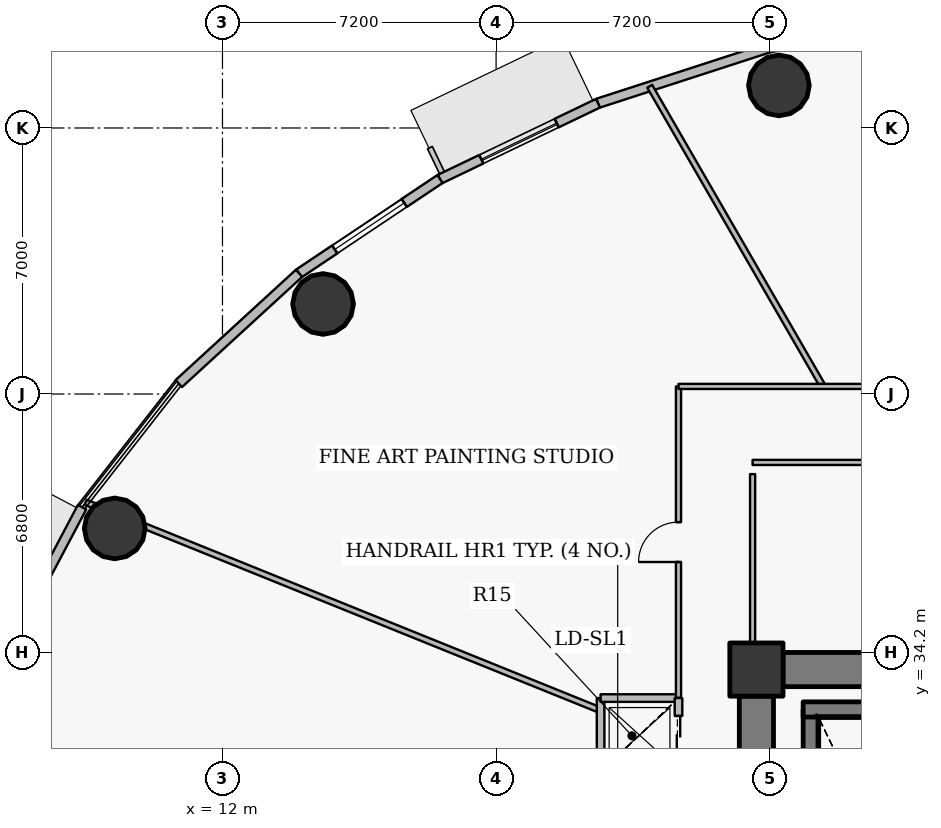
"""IFC4 building model, lengths in metres.
Left out: names, types, materials, properties, quantities, classifications, styles, units other than length and angle.
Written with IfcOpenShell. Run it as: python <this file> out.ifc"""

import sys

from ifc_helpers import new_model, si_unit, direction, frame, frame_2d, origin, origin_2d, place, context, subcontext, project, spatial, rectangle, hollow_circle, extrude, source, transform, mapped, element, fill, save


model = new_model("IFC4")
c1 = context("Model", 3, precision=1e-05, world=origin(), true_north=direction((0.0, 1.0)))
c2 = subcontext(c1, "Body", "Model", "MODEL_VIEW")
j1 = project(units=[si_unit("LENGTHUNIT", "METRE"), si_unit("PLANEANGLEUNIT", "RADIAN")], contexts=[c1])
p1 = place(None, origin())
s1 = spatial("IfcSite", under=j1, at=p1, CompositionType="ELEMENT")
p2 = place(p1, origin())
s2 = spatial("IfcBuilding", under=s1, at=p2, CompositionType="ELEMENT")
p3 = place(p2, frame((0.0, 0.0, 45.0)))
s3 = spatial("IfcBuildingStorey", under=s2, at=p3, CompositionType="ELEMENT", Elevation=45.0)
p4 = place(p3, frame((26.05, 33.75, 0.0), z_axis=(0.0, 0.0, 1.0), x_axis=(1.0, 0.0, 0.0)))
e1 = element("IfcColumn", 1, at=p4, inside=s3, PredefinedType="COLUMN", context=c2, shape_type="SweptSolid", body=[
    extrude(rectangle(XDim=1.4, YDim=1.4, at=origin_2d()), origin(), (0.0, 0.0, 1.0), 4.2),
])
p5 = place(p3, frame((27.48, 24.1, 0.0), z_axis=(0.0, 0.0, 1.0), x_axis=(0.0, 1.0, 0.0)))
e2 = element("IfcWall", 2, at=p5, inside=s3, PredefinedType="SHEAR", context=c2, shape_type="SweptSolid", body=[
    extrude(rectangle(XDim=8.6, YDim=0.4, at=frame_2d((4.3, 0.0))), origin(), (0.0, 0.0, 1.0), 4.2),
])
p6 = place(p3, frame((27.28, 32.7, 0.0), z_axis=(0.0, 0.0, 1.0), x_axis=(1.0, 0.0, 0.0)))
e3 = element("IfcWall", 3, at=p6, inside=s3, PredefinedType="SHEAR", context=c2, shape_type="SweptSolid", body=[
    extrude(rectangle(XDim=4.1, YDim=0.4, at=frame_2d((2.05, 0.0))), origin(), (0.0, 0.0, 1.0), 4.2),
])
p7 = place(p3, frame((26.75, 33.75, 0.0), z_axis=(0.0, 0.0, 1.0), x_axis=(1.0, 0.0, 0.0)))
e4 = element("IfcWall", 4, at=p7, inside=s3, PredefinedType="SHEAR", context=c2, shape_type="SweptSolid", body=[
    extrude(rectangle(XDim=18.5, YDim=0.9, at=frame_2d((9.25, 0.0))), origin(), (0.0, 0.0, 1.0), 3.4),
])
p8 = place(p3, frame((26.05, 20.95, 0.0), z_axis=(0.0, 0.0, 1.0), x_axis=(0.0, 1.0, 0.0)))
e5 = element("IfcWall", 5, at=p8, inside=s3, PredefinedType="SHEAR", context=c2, shape_type="SweptSolid", body=[
    extrude(rectangle(XDim=12.1, YDim=0.9, at=frame_2d((6.05, 0.0))), origin(), (0.0, 0.0, 1.0), 3.4),
])
p9 = place(p8, frame((5.64, 0.0, 0.0)))
e6 = element("IfcOpeningElement", 6, at=p9, cuts=e5, PredefinedType="OPENING", context=c2, shape_type="SweptSolid", body=[
    extrude(rectangle(XDim=0.82, YDim=2.1, at=origin_2d()), frame((0.41, 0.46, 1.05), z_axis=(0.0, -1.0, 0.0), x_axis=(1.0, 0.0, 0.0)), (0.0, 0.0, 1.0), 0.92),
])
for number, where, z_axis, x_axis in (
    (7, (26.642, 49.12, 0.0), (0.0, 0.0, 1.0), (1.0, 0.0, 0.0)),
    (8, (14.647, 43.369, 0.0), (0.0, 0.0, 1.0), (1.0, 0.0, 0.0)),
    (9, (9.165, 37.464, 0.0), (0.0, 0.0, 1.0), (1.0, 0.0, 0.0)),
):
    element("IfcColumn", number, at=place(p3, frame(where, z_axis=z_axis, x_axis=x_axis)), inside=s3, PredefinedType="COLUMN", context=c2, shape_type="SweptSolid", body=[
        extrude(hollow_circle(Radius=0.8, WallThickness=0.045, at=origin_2d()), origin(), (0.0, 0.0, 1.0), 4.2),
    ])
p10 = place(p3, frame((21.882, 48.651, 0.0), z_axis=(0.0, 0.0, 1.0), x_axis=(0.951207699013, 0.308551313946, 0.0)))
e10 = element("IfcWall", 10, at=p10, inside=s3, PredefinedType="SOLIDWALL", context=c2, shape_type="SweptSolid", body=[
    extrude(rectangle(XDim=4.739, YDim=0.25, at=frame_2d((2.369, 0.0))), origin(), (0.0, 0.0, 1.0), 3.95),
])
p11 = place(p3, frame((17.723, 46.656, 0.0), z_axis=(0.0, 0.0, 1.0), x_axis=(0.901601503137, 0.432567601123, 0.0)))
e11 = element("IfcWall", 11, at=p11, inside=s3, PredefinedType="SOLIDWALL", context=c2, shape_type="SweptSolid", body=[
    extrude(rectangle(XDim=4.613, YDim=0.25, at=frame_2d((2.306, 0.0))), origin(), (0.0, 0.0, 1.0), 3.95),
])
p12 = place(p11, frame((1.207, 0.0, 0.9)))
e12 = element("IfcOpeningElement", 12, at=p12, cuts=e11, PredefinedType="OPENING", context=c2, shape_type="SweptSolid", body=[
    extrude(rectangle(XDim=2.2, YDim=2.0, at=origin_2d()), frame((1.1, 0.135, 1.0), z_axis=(0.0, -1.0, 0.0), x_axis=(1.0, 0.0, 0.0)), (0.0, 0.0, 1.0), 0.27),
])
p13 = place(p3, frame((14.015, 44.176, 0.0), z_axis=(0.0, 0.0, 1.0), x_axis=(0.831240982525, 0.555912249343, 0.0)))
e13 = element("IfcWall", 13, at=p13, inside=s3, PredefinedType="SOLIDWALL", context=c2, shape_type="SweptSolid", body=[
    extrude(rectangle(XDim=4.46, YDim=0.25, at=frame_2d((2.23, 0.0))), origin(), (0.0, 0.0, 1.0), 3.95),
])
p14 = place(p13, frame((1.13, 0.0, 0.9)))
e14 = element("IfcOpeningElement", 14, at=p14, cuts=e13, PredefinedType="OPENING", context=c2, shape_type="SweptSolid", body=[
    extrude(rectangle(XDim=2.2, YDim=2.0, at=origin_2d()), frame((1.1, 0.135, 1.0), z_axis=(0.0, -1.0, 0.0), x_axis=(1.0, 0.0, 0.0)), (0.0, 0.0, 1.0), 0.27),
])
p15 = place(p3, frame((10.85, 41.275, 0.0), z_axis=(0.0, 0.0, 1.0), x_axis=(0.737116376281, 0.67576582321, 0.0)))
e15 = element("IfcWall", 15, at=p15, inside=s3, PredefinedType="SOLIDWALL", context=c2, shape_type="SweptSolid", body=[
    extrude(rectangle(XDim=4.294, YDim=0.25, at=frame_2d((2.147, 0.0))), origin(), (0.0, 0.0, 1.0), 3.95),
])
p16 = place(p3, frame((6.442, 34.501, 0.0), z_axis=(0.0, 0.0, 1.0), x_axis=(0.467662443071, 0.883907144072, 0.0)))
e16 = element("IfcWall", 16, at=p16, inside=s3, PredefinedType="SOLIDWALL", context=c2, shape_type="SweptSolid", body=[
    extrude(rectangle(XDim=3.984, YDim=0.25, at=frame_2d((1.992, 0.0))), origin(), (0.0, 0.0, 1.0), 3.95),
])
p17 = place(p3, frame((8.4, 38.151, 0.0), z_axis=(0.0, 0.0, 1.0), x_axis=(0.927179581649, -0.374617169084, 0.0)))
e17 = element("IfcWall", 17, at=p17, inside=s3, PredefinedType="PARTITIONING", context=c2, shape_type="SweptSolid", body=[
    extrude(rectangle(XDim=14.615, YDim=0.15, at=frame_2d((7.307, 0.0))), origin(), (0.0, 0.0, 1.0), 3.285),
])
p18 = place(p3, frame((21.95, 31.12, 0.0), z_axis=(0.0, 0.0, 1.0), x_axis=(0.0, 1.0, 0.0)))
e18 = element("IfcWall", 18, at=p18, inside=s3, PredefinedType="PARTITIONING", context=c2, shape_type="SweptSolid", body=[
    extrude(rectangle(XDim=1.88, YDim=0.2, at=frame_2d((0.94, 0.0))), origin(), (0.0, 0.0, 1.0), 3.285),
])
p19 = place(p3, frame((21.95, 33.0, 0.0), z_axis=(0.0, 0.0, 1.0), x_axis=(1.0, 0.0, 0.0)))
e19 = element("IfcWall", 19, at=p19, inside=s3, PredefinedType="PARTITIONING", context=c2, shape_type="SweptSolid", body=[
    extrude(rectangle(XDim=2.05, YDim=0.2, at=frame_2d((1.025, 0.0))), origin(), (0.0, 0.0, 1.0), 3.95),
])
p20 = place(p3, frame((23.242, 49.098, 0.0), z_axis=(0.0, 0.0, 1.0), x_axis=(0.499985867395, -0.866033563094, 0.0)))
e20 = element("IfcWall", 20, at=p20, inside=s3, PredefinedType="PARTITIONING", context=c2, shape_type="SweptSolid", body=[
    extrude(rectangle(XDim=9.119, YDim=0.15, at=frame_2d((4.56, 0.0))), origin(), (0.0, 0.0, 1.0), 3.335),
])
p21 = place(p3, frame((24.0, 27.59, 0.0), z_axis=(0.0, 0.0, 1.0), x_axis=(0.0, 1.0, 0.0)))
e21 = element("IfcWall", 21, at=p21, inside=s3, PredefinedType="PARTITIONING", context=c2, shape_type="SweptSolid", body=[
    extrude(rectangle(XDim=5.41, YDim=0.2, at=frame_2d((2.705, 0.0))), origin(), (0.0, 0.0, 1.0), 3.285),
])
p22 = place(p21, frame((1.185, 0.0, 0.0)))
e22 = element("IfcOpeningElement", 22, at=p22, cuts=e21, PredefinedType="OPENING", context=c2, shape_type="SweptSolid", body=[
    extrude(rectangle(XDim=1.2, YDim=2.15, at=origin_2d()), frame((0.6, 0.11, 1.075), z_axis=(0.0, -1.0, 0.0), x_axis=(1.0, 0.0, 0.0)), (0.0, 0.0, 1.0), 0.22),
])
p23 = place(p21, frame((3.89, 0.0, 0.0)))
e23 = element("IfcOpeningElement", 23, at=p23, cuts=e21, PredefinedType="OPENING", context=c2, shape_type="SweptSolid", body=[
    extrude(rectangle(XDim=1.05, YDim=2.15, at=origin_2d()), frame((0.525, 0.11, 1.075), z_axis=(0.0, -1.0, 0.0), x_axis=(1.0, 0.0, 0.0)), (0.0, 0.0, 1.0), 0.22),
])
p24 = place(p3, frame((24.0, 33.01, 0.0), z_axis=(0.0, 0.0, 1.0), x_axis=(0.0, 1.0, 0.0)))
e24 = element("IfcWall", 24, at=p24, inside=s3, PredefinedType="PARTITIONING", context=c2, shape_type="SweptSolid", body=[
    extrude(rectangle(XDim=8.19, YDim=0.135, at=frame_2d((4.095, 0.0))), origin(), (0.0, 0.0, 1.0), 3.285),
])
p25 = place(p24, frame((3.57, 0.0, 0.0)))
e25 = element("IfcOpeningElement", 25, at=p25, cuts=e24, PredefinedType="OPENING", context=c2, shape_type="SweptSolid", body=[
    extrude(rectangle(XDim=1.05, YDim=2.15, at=origin_2d()), frame((0.525, 0.078, 1.075), z_axis=(0.0, -1.0, 0.0), x_axis=(1.0, 0.0, 0.0)), (0.0, 0.0, 1.0), 0.155),
])
p26 = place(p3, frame((24.0, 41.2, 0.0), z_axis=(0.0, 0.0, 1.0), x_axis=(1.0, 0.0, 0.0)))
e26 = element("IfcWall", 26, at=p26, inside=s3, PredefinedType="PARTITIONING", context=c2, shape_type="SweptSolid", body=[
    extrude(rectangle(XDim=24.0, YDim=0.135, at=frame_2d((12.0, 0.0))), origin(), (0.0, 0.0, 1.0), 3.285),
])
p27 = place(p26, frame((15.574, 0.0, 0.0)))
e27 = element("IfcOpeningElement", 27, at=p27, cuts=e26, PredefinedType="OPENING", context=c2, shape_type="SweptSolid", body=[
    extrude(rectangle(XDim=1.05, YDim=2.15, at=origin_2d()), frame((0.525, 0.078, 1.075), z_axis=(0.0, -1.0, 0.0), x_axis=(1.0, 0.0, 0.0)), (0.0, 0.0, 1.0), 0.155),
])
p28 = place(p26, frame((7.376, 0.0, 0.0)))
e28 = element("IfcOpeningElement", 28, at=p28, cuts=e26, PredefinedType="OPENING", context=c2, shape_type="SweptSolid", body=[
    extrude(rectangle(XDim=1.05, YDim=2.15, at=origin_2d()), frame((0.525, 0.078, 1.075), z_axis=(0.0, -1.0, 0.0), x_axis=(1.0, 0.0, 0.0)), (0.0, 0.0, 1.0), 0.155),
])
p29 = place(p3, frame((38.893, 39.2, 0.0), z_axis=(0.0, 0.0, 1.0), x_axis=(-1.0, 0.0, 0.0)))
e29 = element("IfcWall", 29, at=p29, inside=s3, PredefinedType="PARTITIONING", context=c2, shape_type="SweptSolid", body=[
    extrude(rectangle(XDim=12.943, YDim=0.135, at=frame_2d((6.471, 0.0))), origin(), (0.0, 0.0, 1.0), 3.285),
])
p30 = place(p3, frame((25.95, 38.893, 0.0), z_axis=(0.0, 0.0, 1.0), x_axis=(0.0, -1.0, 0.0)))
e30 = element("IfcWall", 30, at=p30, inside=s3, PredefinedType="PARTITIONING", context=c2, shape_type="SweptSolid", body=[
    extrude(rectangle(XDim=4.693, YDim=0.135, at=frame_2d((2.346, 0.0))), origin(), (0.0, 0.0, 1.0), 3.285),
])
p31 = place(p3, frame((25.6, 34.2, 0.0), z_axis=(0.0, 0.0, 1.0), x_axis=(0.0, -1.0, 0.0)))
e31 = element("IfcWall", 31, at=p31, inside=s3, PredefinedType="PARTITIONING", context=c2, shape_type="SweptSolid", body=[
    extrude(rectangle(XDim=1.14, YDim=0.135, at=frame_2d((0.57, 0.0))), origin(), (0.0, 0.0, 1.0), 3.95),
])
m1 = source(origin(), c2, "Body", "SweptSolid", [
    extrude(rectangle(XDim=2.2, YDim=2.0, at=origin_2d()), frame((1.1, 0.03, 1.0), z_axis=(0.0, -1.0, 0.0), x_axis=(1.0, 0.0, 0.0)), (0.0, 0.0, 1.0), 0.06),
])
p32 = place(p12, origin())
e32 = element("IfcWindow", 32, at=p32, inside=s3, PartitioningType="TRIPLE_PANEL_VERTICAL", PredefinedType="WINDOW", context=c2, shape_type="MappedRepresentation", body=[
    mapped(m1, transform((0.0, 0.0, 0.0), x_axis=(1.0, 0.0, 0.0), y_axis=(0.0, 1.0, 0.0), z_axis=(0.0, 0.0, 1.0), scale=1.0)),
])
fill(e12, e32)
p33 = place(p14, origin())
e33 = element("IfcWindow", 33, at=p33, inside=s3, PartitioningType="TRIPLE_PANEL_VERTICAL", PredefinedType="WINDOW", context=c2, shape_type="MappedRepresentation", body=[
    mapped(m1, transform((0.0, 0.0, 0.0), x_axis=(1.0, 0.0, 0.0), y_axis=(0.0, 1.0, 0.0), z_axis=(0.0, 0.0, 1.0), scale=1.0)),
])
fill(e14, e33)
m2 = source(origin(), c2, "Body", "SweptSolid", [
    extrude(rectangle(XDim=1.05, YDim=2.15, at=origin_2d()), frame((0.525, 0.025, 1.075), z_axis=(0.0, -1.0, 0.0), x_axis=(1.0, 0.0, 0.0)), (0.0, 0.0, 1.0), 0.05),
])
p34 = place(p23, origin())
e34 = element("IfcDoor", 34, at=p34, inside=s3, OperationType="DOUBLE_DOOR_SLIDING", PredefinedType="USERDEFINED", context=c2, shape_type="MappedRepresentation", body=[
    mapped(m2, transform((0.0, 0.0, 0.0), x_axis=(1.0, 0.0, 0.0), y_axis=(0.0, 1.0, 0.0), z_axis=(0.0, 0.0, 1.0), scale=1.0)),
])
fill(e23, e34)
m3 = source(origin(), c2, "Body", "SweptSolid", [
    extrude(rectangle(XDim=1.05, YDim=2.15, at=origin_2d()), frame((0.525, 0.025, 1.075), z_axis=(0.0, -1.0, 0.0), x_axis=(1.0, 0.0, 0.0)), (0.0, 0.0, 1.0), 0.05),
])
p35 = place(p25, origin())
e35 = element("IfcDoor", 35, at=p35, inside=s3, OperationType="SINGLE_SWING_LEFT", PredefinedType="DOOR", context=c2, shape_type="MappedRepresentation", body=[
    mapped(m3, transform((0.0, 0.0, 0.0), x_axis=(1.0, 0.0, 0.0), y_axis=(0.0, 1.0, 0.0), z_axis=(0.0, 0.0, 1.0), scale=1.0)),
])
fill(e25, e35)
save(model, sys.argv[1])
